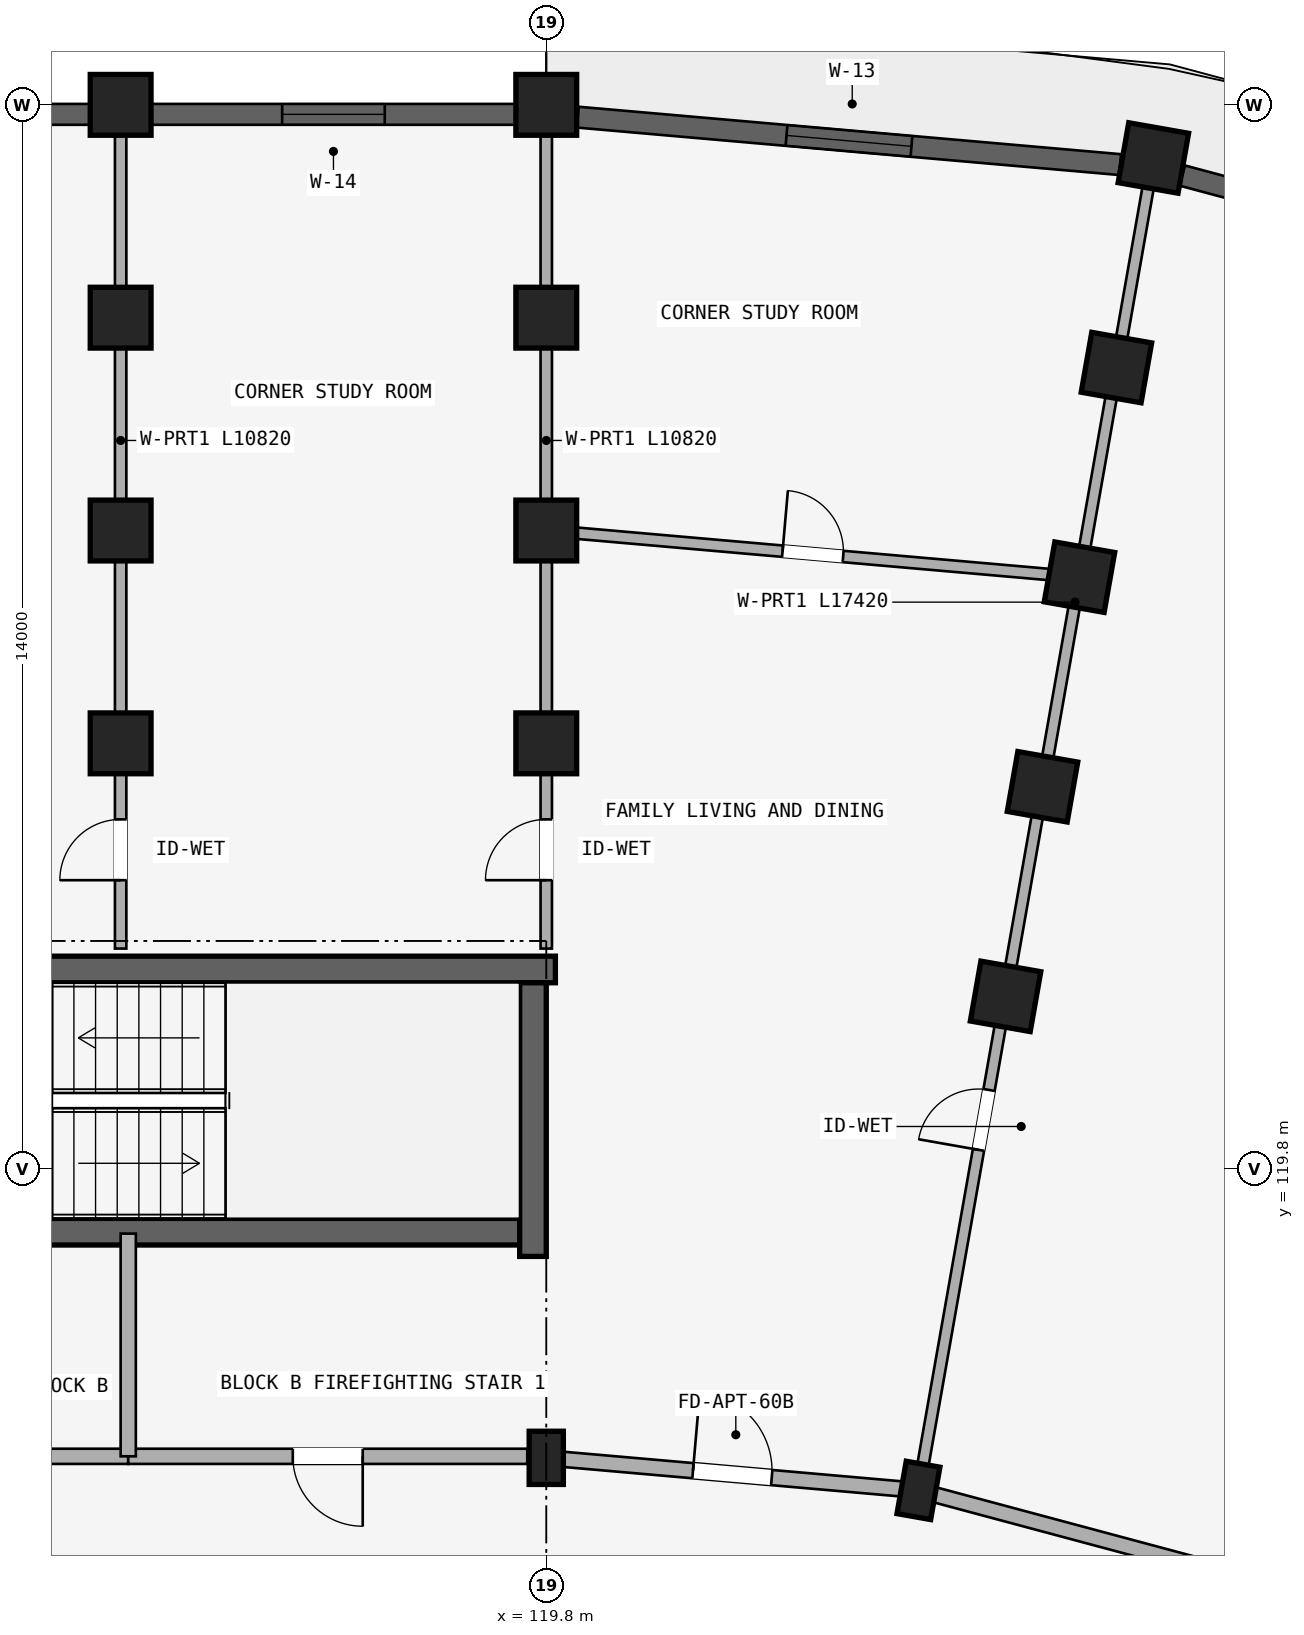
"""IFC4 building model, lengths in metres.
Left out: names, types, materials, properties, quantities, classifications, styles, units other than length and angle.
Written with IfcOpenShell. Run it as: python <this file> out.ifc"""

import sys

from ifc_helpers import new_model, si_unit, direction, frame, frame_2d, origin, origin_2d, place, context, subcontext, project, spatial, rectangle, extrude, element, fill, save


model = new_model("IFC4")
c1 = context("Model", 3, precision=1e-05, world=origin(), true_north=direction((0.0, 1.0)))
c2 = subcontext(c1, "Body", "Model", "MODEL_VIEW")
j1 = project(units=[si_unit("LENGTHUNIT", "METRE"), si_unit("PLANEANGLEUNIT", "RADIAN")], contexts=[c1])
p1 = place(None, origin())
s1 = spatial("IfcSite", under=j1, at=p1, CompositionType="ELEMENT")
p2 = place(p1, origin())
s2 = spatial("IfcBuilding", under=s1, at=p2, CompositionType="ELEMENT")
p3 = place(p2, frame((0.0, 0.0, 11.85)))
s3 = spatial("IfcBuildingStorey", under=s2, at=p3, CompositionType="ELEMENT", Elevation=11.85)
p4 = place(p3, frame((119.92, 122.425, 0.0), z_axis=(0.0, 0.0, 1.0), x_axis=(-1.0, 0.0, 0.0)))
e1 = element("IfcWall", 1, at=p4, inside=s3, PredefinedType="SHEAR", context=c2, shape_type="SweptSolid", body=[
    extrude(rectangle(XDim=8.545, YDim=0.35, at=frame_2d((4.272, 0.0))), origin(), (0.0, 0.0, 1.0), 2.93),
])
p5 = place(p3, frame((119.45, 118.975, 0.0), z_axis=(0.0, 0.0, 1.0), x_axis=(-1.0, 0.0, 0.0)))
e2 = element("IfcWall", 2, at=p5, inside=s3, PredefinedType="SHEAR", context=c2, shape_type="SweptSolid", body=[
    extrude(rectangle(XDim=8.075, YDim=0.35, at=frame_2d((4.038, 0.0))), origin(), (0.0, 0.0, 1.0), 2.93),
])
p6 = place(p5, frame((6.38, 0.0, 0.0)))
e3 = element("IfcOpeningElement", 3, at=p6, cuts=e2, PredefinedType="OPENING", context=c2, shape_type="SweptSolid", body=[
    extrude(rectangle(XDim=1.24, YDim=2.15, at=frame_2d((0.62, 1.075))), frame((0.0, 0.185, 0.0), z_axis=(0.0, -1.0, 0.0), x_axis=(1.0, 0.0, 0.0)), (0.0, 0.0, 1.0), 0.37),
])
p7 = place(p3, frame((119.625, 118.65, 0.0), z_axis=(0.0, 0.0, 1.0), x_axis=(0.0, 1.0, 0.0)))
e4 = element("IfcWall", 4, at=p7, inside=s3, PredefinedType="SHEAR", context=c2, shape_type="SweptSolid", body=[
    extrude(rectangle(XDim=3.6, YDim=0.35, at=frame_2d((1.8, 0.0))), origin(), (0.0, 0.0, 1.0), 2.93),
])
p8 = place(p3, frame((119.8, 116.0, 0.0), z_axis=(0.0, 0.0, 1.0), x_axis=(1.0, 0.0, 0.0)))
e5 = element("IfcColumn", 5, at=p8, inside=s3, PredefinedType="COLUMN", context=c2, shape_type="SweptSolid", body=[
    extrude(rectangle(XDim=0.45, YDim=0.7, at=origin_2d()), origin(), (0.0, 0.0, 1.0), 2.93),
])
for number, where, z_axis, x_axis in (
    (6, (119.8, 125.4, 0.0), (0.0, 0.0, 1.0), (1.0, 0.0, 0.0)),
    (7, (119.8, 128.2, 0.0), (0.0, 0.0, 1.0), (1.0, 0.0, 0.0)),
    (8, (119.8, 131.0, 0.0), (0.0, 0.0, 1.0), (1.0, 0.0, 0.0)),
    (9, (119.8, 133.8, 0.0), (0.0, 0.0, 1.0), (1.0, 0.0, 0.0)),
):
    element("IfcColumn", number, at=place(p3, frame(where, z_axis=z_axis, x_axis=x_axis)), inside=s3, PredefinedType="COLUMN", context=c2, shape_type="SweptSolid", body=[
        extrude(rectangle(XDim=0.8, YDim=0.8, at=origin_2d()), origin(), (0.0, 0.0, 1.0), 2.93),
    ])
p9 = place(p3, frame((124.697, 115.572, 0.0), z_axis=(0.0, 0.0, 1.0), x_axis=(-0.984807753012, 0.173648177667, 0.0)))
e10 = element("IfcColumn", 10, at=p9, inside=s3, PredefinedType="COLUMN", context=c2, shape_type="SweptSolid", body=[
    extrude(rectangle(XDim=0.45, YDim=0.7, at=origin_2d()), origin(), (0.0, 0.0, 1.0), 2.93),
])
for number, where, z_axis, x_axis in (
    (11, (125.843, 122.071, 0.0), (0.0, 0.0, 1.0), (-0.985, 0.174, 0.0)),
    (12, (126.329, 124.829, 0.0), (0.0, 0.0, 1.0), (-0.985, 0.174, 0.0)),
    (13, (126.815, 127.586, 0.0), (0.0, 0.0, 1.0), (-0.985, 0.174, 0.0)),
    (14, (127.302, 130.344, 0.0), (0.0, 0.0, 1.0), (-0.985, 0.174, 0.0)),
    (15, (127.788, 133.101, 0.0), (0.0, 0.0, 1.0), (-0.985, 0.174, 0.0)),
    (16, (114.2, 125.4, 0.0), (0.0, 0.0, 1.0), (1.0, 0.0, 0.0)),
    (17, (114.2, 128.2, 0.0), (0.0, 0.0, 1.0), (1.0, 0.0, 0.0)),
    (18, (114.2, 131.0, 0.0), (0.0, 0.0, 1.0), (1.0, 0.0, 0.0)),
    (19, (114.2, 133.8, 0.0), (0.0, 0.0, 1.0), (1.0, 0.0, 0.0)),
):
    element("IfcColumn", number, at=place(p3, frame(where, z_axis=z_axis, x_axis=x_axis)), inside=s3, PredefinedType="COLUMN", context=c2, shape_type="SweptSolid", body=[
        extrude(rectangle(XDim=0.8, YDim=0.8, at=origin_2d()), origin(), (0.0, 0.0, 1.0), 2.93),
    ])
p10 = place(p3, frame((114.3, 116.02, 0.0), z_axis=(0.0, 0.0, 1.0), x_axis=(-1.0, 0.0, 0.0)))
e20 = element("IfcWall", 20, at=p10, inside=s3, PredefinedType="STANDARD", context=c2, shape_type="SweptSolid", body=[
    extrude(rectangle(XDim=5.65, YDim=0.2, at=frame_2d((2.825, 0.0))), origin(), (0.0, 0.0, 1.0), 2.372),
])
p11 = place(p10, frame((1.923, 0.0, 0.0)))
e21 = element("IfcOpeningElement", 21, at=p11, cuts=e20, PredefinedType="OPENING", context=c2, shape_type="SweptSolid", body=[
    extrude(rectangle(XDim=1.24, YDim=2.15, at=frame_2d((0.62, 1.075))), frame((0.0, 0.11, 0.0), z_axis=(0.0, -1.0, 0.0), x_axis=(1.0, 0.0, 0.0)), (0.0, 0.0, 1.0), 0.22),
])
p12 = place(p3, frame((119.55, 116.02, 0.0), z_axis=(0.0, 0.0, 1.0), x_axis=(-1.0, 0.0, 0.0)))
e22 = element("IfcWall", 22, at=p12, inside=s3, PredefinedType="STANDARD", context=c2, shape_type="SweptSolid", body=[
    extrude(rectangle(XDim=5.25, YDim=0.2, at=frame_2d((2.625, 0.0))), origin(), (0.0, 0.0, 1.0), 2.372),
])
p13 = place(p12, frame((2.165, 0.0, 0.0)))
e23 = element("IfcOpeningElement", 23, at=p13, cuts=e22, PredefinedType="OPENING", context=c2, shape_type="SweptSolid", body=[
    extrude(rectangle(XDim=0.92, YDim=2.1, at=frame_2d((0.46, 1.05))), frame((0.0, 0.11, 0.0), z_axis=(0.0, -1.0, 0.0), x_axis=(1.0, 0.0, 0.0)), (0.0, 0.0, 1.0), 0.22),
])
p14 = place(p3, frame((114.3, 116.02, 0.0), z_axis=(0.0, 0.0, 1.0), x_axis=(0.0, 1.0, 0.0)))
e24 = element("IfcWall", 24, at=p14, inside=s3, PredefinedType="STANDARD", context=c2, shape_type="SweptSolid", body=[
    extrude(rectangle(XDim=2.93, YDim=0.2, at=frame_2d((1.465, 0.0))), origin(), (0.0, 0.0, 1.0), 2.372),
])
p15 = place(p3, frame((114.2, 122.7, 0.0), z_axis=(0.0, 0.0, 1.0), x_axis=(0.0, 1.0, 0.0)))
e25 = element("IfcWall", 25, at=p15, inside=s3, PredefinedType="PARTITIONING", context=c2, shape_type="SweptSolid", body=[
    extrude(rectangle(XDim=10.82, YDim=0.15, at=frame_2d((5.41, 0.0))), origin(), (0.0, 0.0, 1.0), 2.372),
])
p16 = place(p15, frame((0.899, 0.0, 0.0)))
e26 = element("IfcOpeningElement", 26, at=p16, cuts=e25, PredefinedType="OPENING", context=c2, shape_type="SweptSolid", body=[
    extrude(rectangle(XDim=0.8, YDim=2.1, at=frame_2d((0.4, 1.05))), frame((0.0, 0.085, 0.0), z_axis=(0.0, -1.0, 0.0), x_axis=(1.0, 0.0, 0.0)), (0.0, 0.0, 1.0), 0.17),
])
p17 = place(p3, frame((119.8, 116.0, 0.0), z_axis=(0.0, 0.0, 1.0), x_axis=(0.996193663584, -0.087167566415, 0.0)))
e27 = element("IfcWall", 27, at=p17, inside=s3, PredefinedType="STANDARD", context=c2, shape_type="SweptSolid", body=[
    extrude(rectangle(XDim=4.916, YDim=0.2, at=frame_2d((2.458, 0.0))), origin(), (0.0, 0.0, 1.0), 2.372),
])
p18 = place(p17, frame((1.938, 0.0, 0.0)))
e28 = element("IfcOpeningElement", 28, at=p18, cuts=e27, PredefinedType="OPENING", context=c2, shape_type="SweptSolid", body=[
    extrude(rectangle(XDim=1.04, YDim=2.15, at=frame_2d((0.52, 1.075))), frame((0.0, 0.11, 0.0), z_axis=(0.0, -1.0, 0.0), x_axis=(1.0, 0.0, 0.0)), (0.0, 0.0, 1.0), 0.22),
])
p19 = place(p3, frame((124.697, 115.572, 0.0), z_axis=(0.0, 0.0, 1.0), x_axis=(0.965930095386, -0.258803112091, 0.0)))
e29 = element("IfcWall", 29, at=p19, inside=s3, PredefinedType="STANDARD", context=c2, shape_type="SweptSolid", body=[
    extrude(rectangle(XDim=4.916, YDim=0.2, at=frame_2d((2.458, 0.0))), origin(), (0.0, 0.0, 1.0), 2.372),
])
p20 = place(p3, frame((119.8, 122.7, 0.0), z_axis=(0.0, 0.0, 1.0), x_axis=(0.0, 1.0, 0.0)))
e30 = element("IfcWall", 30, at=p20, inside=s3, PredefinedType="PARTITIONING", context=c2, shape_type="SweptSolid", body=[
    extrude(rectangle(XDim=10.82, YDim=0.15, at=frame_2d((5.41, 0.0))), origin(), (0.0, 0.0, 1.0), 2.372),
])
p21 = place(p20, frame((0.899, 0.0, 0.0)))
e31 = element("IfcOpeningElement", 31, at=p21, cuts=e30, PredefinedType="OPENING", context=c2, shape_type="SweptSolid", body=[
    extrude(rectangle(XDim=0.8, YDim=2.1, at=frame_2d((0.4, 1.05))), frame((0.0, 0.085, 0.0), z_axis=(0.0, -1.0, 0.0), x_axis=(1.0, 0.0, 0.0)), (0.0, 0.0, 1.0), 0.17),
])
p22 = place(p3, frame((124.714, 115.67, 0.0), z_axis=(0.0, 0.0, 1.0), x_axis=(0.173646216546, 0.984808098809, 0.0)))
e32 = element("IfcWall", 32, at=p22, inside=s3, PredefinedType="PARTITIONING", context=c2, shape_type="SweptSolid", body=[
    extrude(rectangle(XDim=17.42, YDim=0.15, at=frame_2d((8.71, 0.0))), origin(), (0.0, 0.0, 1.0), 2.372),
])
p23 = place(p22, frame((4.45, 0.0, 0.0)))
e33 = element("IfcOpeningElement", 33, at=p23, cuts=e32, PredefinedType="OPENING", context=c2, shape_type="SweptSolid", body=[
    extrude(rectangle(XDim=0.8, YDim=2.1, at=frame_2d((0.4, 1.05))), frame((0.0, 0.085, 0.0), z_axis=(0.0, -1.0, 0.0), x_axis=(1.0, 0.0, 0.0)), (0.0, 0.0, 1.0), 0.17),
])
p24 = place(p3, frame((119.8, 128.2, 0.0), z_axis=(0.0, 0.0, 1.0), x_axis=(0.996194658198, -0.087156198737, 0.0)))
e34 = element("IfcWall", 34, at=p24, inside=s3, PredefinedType="PLUMBINGWALL", context=c2, shape_type="SweptSolid", body=[
    extrude(rectangle(XDim=7.042, YDim=0.15, at=frame_2d((3.521, 0.0))), origin(), (0.0, 0.0, 1.0), 2.372),
])
p25 = place(p24, frame((3.121, 0.0, 0.0)))
e35 = element("IfcOpeningElement", 35, at=p25, cuts=e34, PredefinedType="OPENING", context=c2, shape_type="SweptSolid", body=[
    extrude(rectangle(XDim=0.8, YDim=2.1, at=frame_2d((0.4, 1.05))), frame((0.0, 0.085, 0.0), z_axis=(0.0, -1.0, 0.0), x_axis=(1.0, 0.0, 0.0)), (0.0, 0.0, 1.0), 0.17),
])
p26 = place(p3, frame((120.215, 133.638, 0.0), z_axis=(0.0, 0.0, 1.0), x_axis=(0.99619608453, -0.08713989423, 0.0)))
e36 = element("IfcWall", 36, at=p26, inside=s3, PredefinedType="STANDARD", context=c2, shape_type="SweptSolid", body=[
    extrude(rectangle(XDim=7.164, YDim=0.275, at=frame_2d((3.582, 0.0))), origin(), (0.0, 0.0, 1.0), 2.372),
])
p27 = place(p26, frame((2.757, 0.0, 0.422)))
e37 = element("IfcOpeningElement", 37, at=p27, cuts=e36, PredefinedType="OPENING", context=c2, shape_type="SweptSolid", body=[
    extrude(rectangle(XDim=1.65, YDim=1.75, at=frame_2d((0.825, 0.875))), frame((0.0, 0.147, 0.0), z_axis=(0.0, -1.0, 0.0), x_axis=(1.0, 0.0, 0.0)), (0.0, 0.0, 1.0), 0.295),
])
p28 = place(p3, frame((128.168, 132.87, 0.0), z_axis=(0.0, 0.0, 1.0), x_axis=(0.965923712619, -0.258826933296, 0.0)))
e38 = element("IfcWall", 38, at=p28, inside=s3, PredefinedType="STANDARD", context=c2, shape_type="SweptSolid", body=[
    extrude(rectangle(XDim=7.164, YDim=0.275, at=frame_2d((3.582, 0.0))), origin(), (0.0, 0.0, 1.0), 2.372),
])
p29 = place(p28, frame((4.69, 0.0, 0.522)))
e39 = element("IfcOpeningElement", 39, at=p29, cuts=e38, PredefinedType="OPENING", context=c2, shape_type="SweptSolid", body=[
    extrude(rectangle(XDim=1.2, YDim=1.5, at=frame_2d((0.6, 0.75))), frame((0.0, 0.147, 0.0), z_axis=(0.0, -1.0, 0.0), x_axis=(1.0, 0.0, 0.0)), (0.0, 0.0, 1.0), 0.295),
])
p30 = place(p28, frame((1.847, 0.0, 0.0)))
e40 = element("IfcOpeningElement", 40, at=p30, cuts=e38, PredefinedType="OPENING", context=c2, shape_type="SweptSolid", body=[
    extrude(rectangle(XDim=1.32, YDim=2.15, at=frame_2d((0.66, 1.075))), frame((0.0, 0.147, 0.0), z_axis=(0.0, -1.0, 0.0), x_axis=(1.0, 0.0, 0.0)), (0.0, 0.0, 1.0), 0.295),
])
p31 = place(p3, frame((119.396, 133.675, 0.0), z_axis=(0.0, 0.0, 1.0), x_axis=(-1.0, 0.0, 0.0)))
e41 = element("IfcWall", 41, at=p31, inside=s3, PredefinedType="STANDARD", context=c2, shape_type="SweptSolid", body=[
    extrude(rectangle(XDim=4.793, YDim=0.275, at=frame_2d((2.396, 0.0))), origin(), (0.0, 0.0, 1.0), 2.472),
])
p32 = place(p31, frame((1.721, 0.0, 0.672)))
e42 = element("IfcOpeningElement", 42, at=p32, cuts=e41, PredefinedType="OPENING", context=c2, shape_type="SweptSolid", body=[
    extrude(rectangle(XDim=1.35, YDim=1.6, at=frame_2d((0.675, 0.8))), frame((0.0, 0.147, 0.0), z_axis=(0.0, -1.0, 0.0), x_axis=(1.0, 0.0, 0.0)), (0.0, 0.0, 1.0), 0.295),
])
p33 = place(p3, frame((113.796, 133.675, 0.0), z_axis=(0.0, 0.0, 1.0), x_axis=(-1.0, 0.0, 0.0)))
e43 = element("IfcWall", 43, at=p33, inside=s3, PredefinedType="STANDARD", context=c2, shape_type="SweptSolid", body=[
    extrude(rectangle(XDim=4.793, YDim=0.275, at=frame_2d((2.396, 0.0))), origin(), (0.0, 0.0, 1.0), 2.472),
])
p34 = place(p33, frame((1.796, 0.0, 0.772)))
e44 = element("IfcOpeningElement", 44, at=p34, cuts=e43, PredefinedType="OPENING", context=c2, shape_type="SweptSolid", body=[
    extrude(rectangle(XDim=1.2, YDim=1.5, at=frame_2d((0.6, 0.75))), frame((0.0, 0.147, 0.0), z_axis=(0.0, -1.0, 0.0), x_axis=(1.0, 0.0, 0.0)), (0.0, 0.0, 1.0), 0.295),
])
p35 = place(p27, origin())
e45 = element("IfcWindow", 45, at=p35, inside=s3, PartitioningType="DOUBLE_PANEL_VERTICAL", PredefinedType="WINDOW", context=c2, shape_type="SweptSolid", body=[
    extrude(rectangle(XDim=1.65, YDim=1.75, at=frame_2d((0.825, 0.875))), frame((0.0, 0.03, 0.0), z_axis=(0.0, -1.0, 0.0), x_axis=(1.0, 0.0, 0.0)), (0.0, 0.0, 1.0), 0.06),
])
fill(e37, e45)
p36 = place(p32, origin())
e46 = element("IfcWindow", 46, at=p36, inside=s3, PartitioningType="DOUBLE_PANEL_VERTICAL", PredefinedType="WINDOW", context=c2, shape_type="SweptSolid", body=[
    extrude(rectangle(XDim=1.35, YDim=1.6, at=frame_2d((0.675, 0.8))), frame((0.0, 0.03, 0.0), z_axis=(0.0, -1.0, 0.0), x_axis=(1.0, 0.0, 0.0)), (0.0, 0.0, 1.0), 0.06),
])
fill(e42, e46)
p37 = place(p13, origin())
e47 = element("IfcDoor", 47, at=p37, inside=s3, OperationType="SINGLE_SWING_LEFT", PredefinedType="DOOR", context=c2, shape_type="SweptSolid", body=[
    extrude(rectangle(XDim=0.92, YDim=2.1, at=frame_2d((0.46, 1.05))), frame((0.0, 0.025, 0.0), z_axis=(0.0, -1.0, 0.0), x_axis=(1.0, 0.0, 0.0)), (0.0, 0.0, 1.0), 0.05),
])
fill(e23, e47)
p38 = place(p16, origin())
e48 = element("IfcDoor", 48, at=p38, inside=s3, OperationType="SINGLE_SWING_LEFT", PredefinedType="DOOR", context=c2, shape_type="SweptSolid", body=[
    extrude(rectangle(XDim=0.8, YDim=2.1, at=frame_2d((0.4, 1.05))), frame((0.0, 0.025, 0.0), z_axis=(0.0, -1.0, 0.0), x_axis=(1.0, 0.0, 0.0)), (0.0, 0.0, 1.0), 0.05),
])
fill(e26, e48)
p39 = place(p21, origin())
e49 = element("IfcDoor", 49, at=p39, inside=s3, OperationType="SINGLE_SWING_LEFT", PredefinedType="DOOR", context=c2, shape_type="SweptSolid", body=[
    extrude(rectangle(XDim=0.8, YDim=2.1, at=frame_2d((0.4, 1.05))), frame((0.0, 0.025, 0.0), z_axis=(0.0, -1.0, 0.0), x_axis=(1.0, 0.0, 0.0)), (0.0, 0.0, 1.0), 0.05),
])
fill(e31, e49)
p40 = place(p23, origin())
e50 = element("IfcDoor", 50, at=p40, inside=s3, OperationType="SINGLE_SWING_LEFT", PredefinedType="DOOR", context=c2, shape_type="SweptSolid", body=[
    extrude(rectangle(XDim=0.8, YDim=2.1, at=frame_2d((0.4, 1.05))), frame((0.0, 0.025, 0.0), z_axis=(0.0, -1.0, 0.0), x_axis=(1.0, 0.0, 0.0)), (0.0, 0.0, 1.0), 0.05),
])
fill(e33, e50)
p41 = place(p18, frame((1.04, 0.0, 0.0), z_axis=(0.0, 0.0, 1.0), x_axis=(-1.0, 0.0, 0.0)))
e51 = element("IfcDoor", 51, at=p41, inside=s3, OperationType="SINGLE_SWING_RIGHT", PredefinedType="DOOR", context=c2, shape_type="SweptSolid", body=[
    extrude(rectangle(XDim=1.04, YDim=2.15, at=frame_2d((0.52, 1.075))), frame((0.0, 0.025, 0.0), z_axis=(0.0, -1.0, 0.0), x_axis=(1.0, 0.0, 0.0)), (0.0, 0.0, 1.0), 0.05),
])
fill(e28, e51)
p42 = place(p25, origin())
e52 = element("IfcDoor", 52, at=p42, inside=s3, OperationType="SINGLE_SWING_LEFT", PredefinedType="DOOR", context=c2, shape_type="SweptSolid", body=[
    extrude(rectangle(XDim=0.8, YDim=2.1, at=frame_2d((0.4, 1.05))), frame((0.0, 0.025, 0.0), z_axis=(0.0, -1.0, 0.0), x_axis=(1.0, 0.0, 0.0)), (0.0, 0.0, 1.0), 0.05),
])
fill(e35, e52)
save(model, sys.argv[1])
